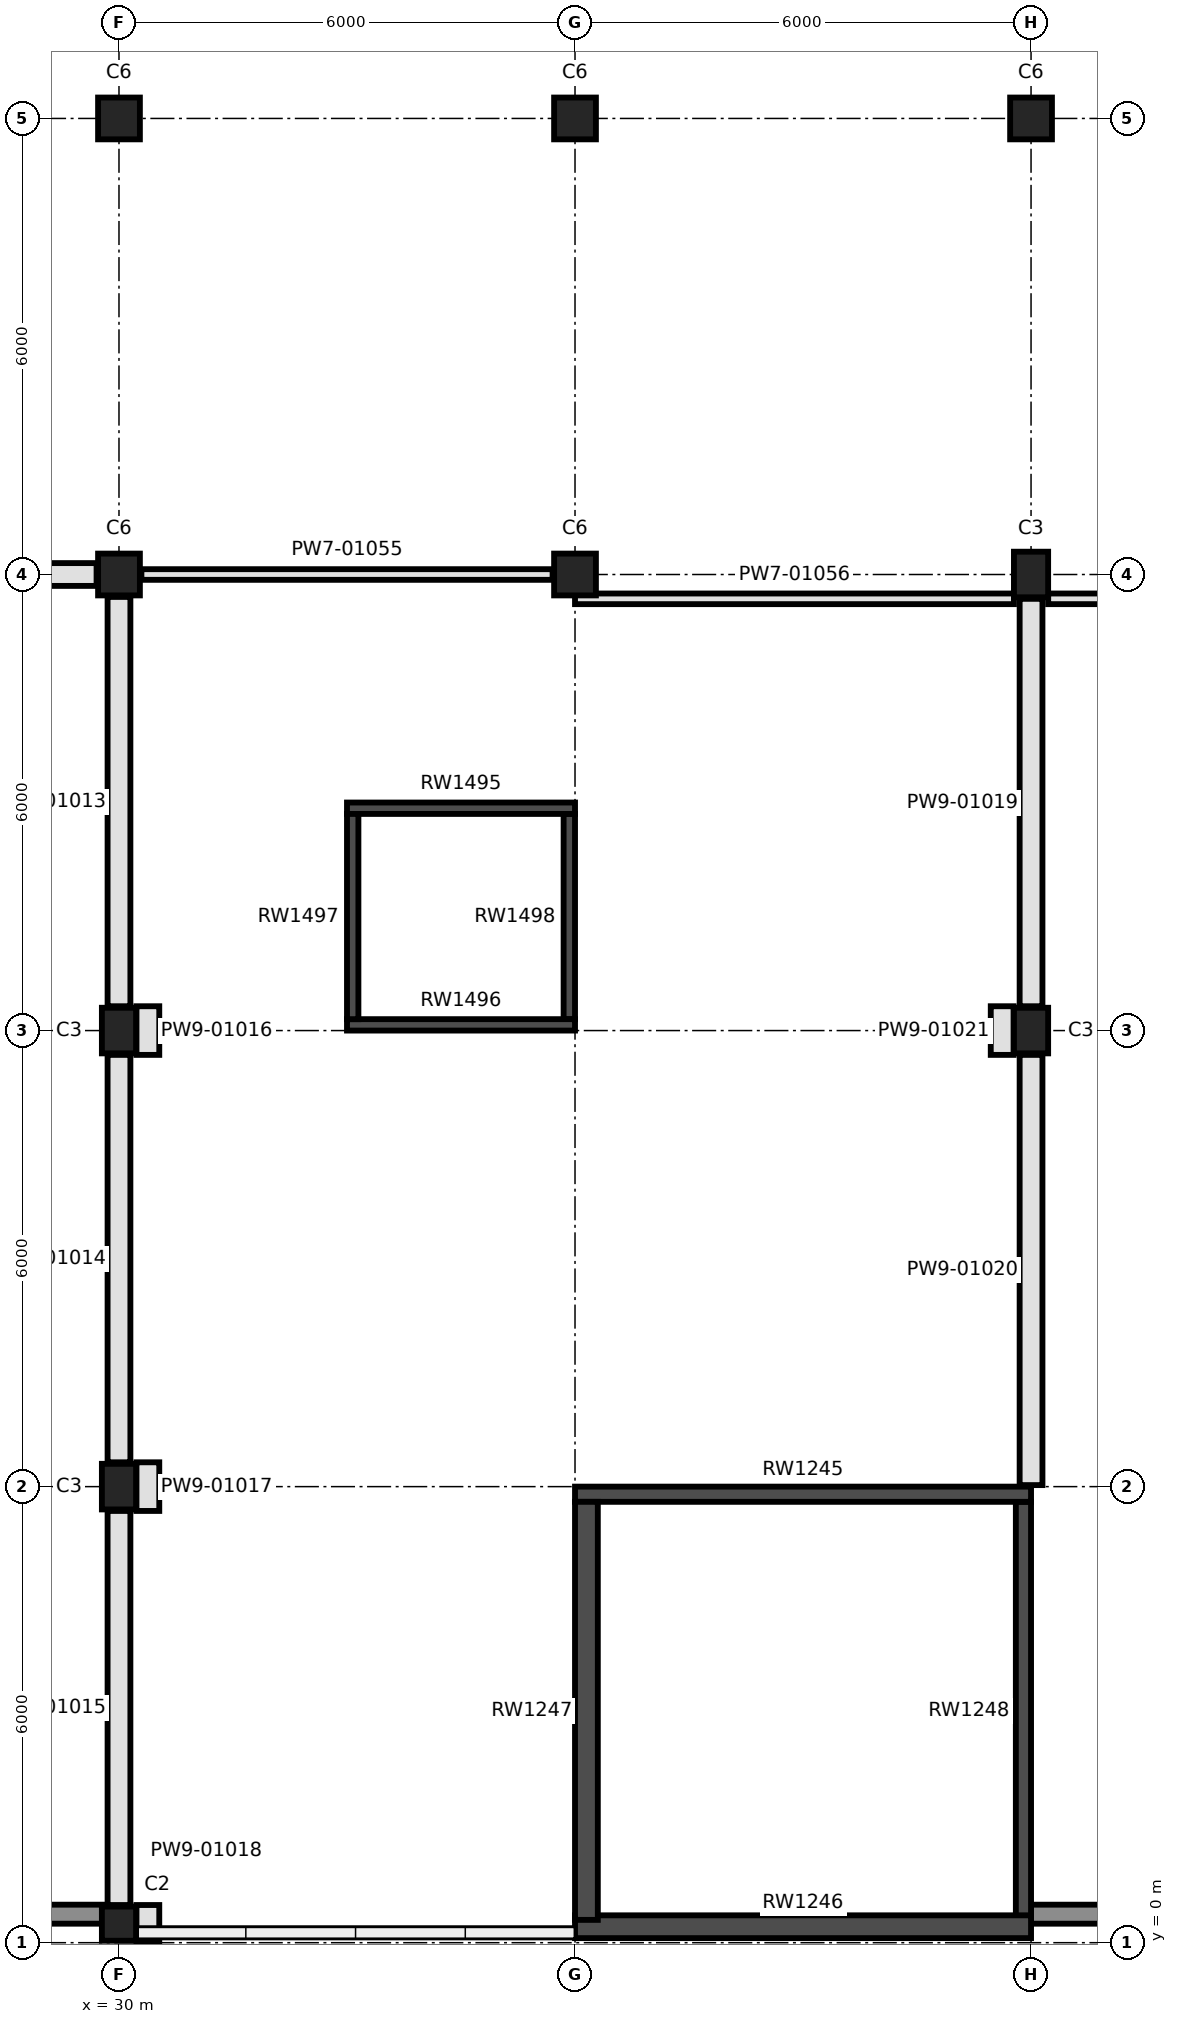
"""IFC4 building model, lengths in metres.
Left out: names, types, materials, properties, quantities, classifications, styles, units other than length and angle.
Written with IfcOpenShell. Run it as: python <this file> out.ifc"""

import sys

from ifc_helpers import new_model, si_unit, direction, frame, frame_2d, origin, origin_2d, place, context, subcontext, project, spatial, rectangle, extrude, element, fill, save


model = new_model("IFC4")
c1 = context("Model", 3, precision=1e-05, world=origin(), true_north=direction((0.0, 1.0)))
c2 = subcontext(c1, "Body", "Model", "MODEL_VIEW")
j1 = project(units=[si_unit("LENGTHUNIT", "METRE"), si_unit("PLANEANGLEUNIT", "RADIAN")], contexts=[c1])
p1 = place(None, origin())
s1 = spatial("IfcSite", under=j1, at=p1, CompositionType="ELEMENT")
p2 = place(p1, origin())
s2 = spatial("IfcBuilding", under=s1, at=p2, CompositionType="ELEMENT")
p3 = place(p2, frame((0.0, 0.0, 7.0)))
s3 = spatial("IfcBuildingStorey", under=s2, at=p3, CompositionType="ELEMENT", Elevation=7.0)
p4 = place(p3, frame((30.0, 0.25, 0.0), z_axis=(0.0, 0.0, 1.0), x_axis=(1.0, 0.0, 0.0)))
e1 = element("IfcColumn", 1, at=p4, inside=s3, PredefinedType="COLUMN", context=c2, shape_type="SweptSolid", body=[
    extrude(rectangle(XDim=0.45, YDim=0.45, at=origin_2d()), origin(), (0.0, 0.0, 1.0), 5.0),
])
for number, where, z_axis, x_axis in (
    (2, (30.0, 6.0, 0.0), (0.0, 0.0, 1.0), (1.0, 0.0, 0.0)),
    (3, (30.0, 12.0, 0.0), (0.0, 0.0, 1.0), (1.0, 0.0, 0.0)),
    (4, (42.0, 12.0, 0.0), (0.0, 0.0, 1.0), (1.0, 0.0, 0.0)),
):
    element("IfcColumn", number, at=place(p3, frame(where, z_axis=z_axis, x_axis=x_axis)), inside=s3, PredefinedType="COLUMN", context=c2, shape_type="SweptSolid", body=[
        extrude(rectangle(XDim=0.45, YDim=0.6, at=origin_2d()), origin(), (0.0, 0.0, 1.0), 5.0),
    ])
for number, where, z_axis, x_axis in (
    (5, (30.0, 18.0, 0.0), (0.0, 0.0, 1.0), (1.0, 0.0, 0.0)),
    (6, (36.0, 18.0, 0.0), (0.0, 0.0, 1.0), (1.0, 0.0, 0.0)),
):
    element("IfcColumn", number, at=place(p3, frame(where, z_axis=z_axis, x_axis=x_axis)), inside=s3, PredefinedType="COLUMN", context=c2, shape_type="SweptSolid", body=[
        extrude(rectangle(XDim=0.55, YDim=0.55, at=origin_2d()), origin(), (0.0, 0.0, 1.0), 5.0),
    ])
p5 = place(p3, frame((42.0, 18.0, 0.0), z_axis=(0.0, 0.0, 1.0), x_axis=(1.0, 0.0, 0.0)))
e7 = element("IfcColumn", 7, at=p5, inside=s3, PredefinedType="COLUMN", context=c2, shape_type="SweptSolid", body=[
    extrude(rectangle(XDim=0.45, YDim=0.6, at=origin_2d()), origin(), (0.0, 0.0, 1.0), 5.0),
])
for number, where, z_axis, x_axis in (
    (8, (30.0, 24.0, 0.0), (0.0, 0.0, 1.0), (1.0, 0.0, 0.0)),
    (9, (36.0, 24.0, 0.0), (0.0, 0.0, 1.0), (1.0, 0.0, 0.0)),
    (10, (42.0, 24.0, 0.0), (0.0, 0.0, 1.0), (1.0, 0.0, 0.0)),
):
    element("IfcColumn", number, at=place(p3, frame(where, z_axis=z_axis, x_axis=x_axis)), inside=s3, PredefinedType="COLUMN", context=c2, shape_type="SweptSolid", body=[
        extrude(rectangle(XDim=0.55, YDim=0.55, at=origin_2d()), origin(), (0.0, 0.0, 1.0), 5.0),
    ])
p6 = place(p3, frame((36.0, 5.9, 0.0), z_axis=(0.0, 0.0, 1.0), x_axis=(1.0, 0.0, 0.0)))
e11 = element("IfcWall", 11, at=p6, inside=s3, PredefinedType="SHEAR", context=c2, shape_type="SweptSolid", body=[
    extrude(rectangle(XDim=6.0, YDim=0.2, at=frame_2d((3.0, 0.0))), origin(), (0.0, 0.0, 1.0), 5.0),
])
p7 = place(p6, frame((0.3, 0.0, 0.0)))
e12 = element("IfcOpeningElement", 12, at=p7, cuts=e11, PredefinedType="OPENING", context=c2, shape_type="SweptSolid", body=[
    extrude(rectangle(XDim=1.1, YDim=2.2, at=frame_2d((0.55, 1.1))), frame((0.0, 0.11, 0.0), z_axis=(0.0, -1.0, 0.0), x_axis=(1.0, 0.0, 0.0)), (0.0, 0.0, 1.0), 0.22),
])
p8 = place(p3, frame((36.0, 0.21, 0.0), z_axis=(0.0, 0.0, 1.0), x_axis=(1.0, 0.0, 0.0)))
e13 = element("IfcWall", 13, at=p8, inside=s3, PredefinedType="SHEAR", context=c2, shape_type="SweptSolid", body=[
    extrude(rectangle(XDim=6.0, YDim=0.3, at=frame_2d((3.0, 0.0))), origin(), (0.0, 0.0, 1.0), 5.0),
])
p9 = place(p3, frame((36.15, 0.3, 0.0), z_axis=(0.0, 0.0, 1.0), x_axis=(0.0, 1.0, 0.0)))
e14 = element("IfcWall", 14, at=p9, inside=s3, PredefinedType="SHEAR", context=c2, shape_type="SweptSolid", body=[
    extrude(rectangle(XDim=5.5, YDim=0.3, at=frame_2d((2.75, 0.0))), origin(), (0.0, 0.0, 1.0), 5.0),
])
p10 = place(p9, frame((1.8, 0.0, 0.0)))
e15 = element("IfcOpeningElement", 15, at=p10, cuts=e14, PredefinedType="OPENING", context=c2, shape_type="SweptSolid", body=[
    extrude(rectangle(XDim=1.8, YDim=2.2, at=frame_2d((0.9, 1.1))), frame((0.0, 0.16, 0.0), z_axis=(0.0, -1.0, 0.0), x_axis=(1.0, 0.0, 0.0)), (0.0, 0.0, 1.0), 0.32),
])
p11 = place(p3, frame((41.9, 0.3, 0.0), z_axis=(0.0, 0.0, 1.0), x_axis=(0.0, 1.0, 0.0)))
e16 = element("IfcWall", 16, at=p11, inside=s3, PredefinedType="SHEAR", context=c2, shape_type="SweptSolid", body=[
    extrude(rectangle(XDim=5.5, YDim=0.2, at=frame_2d((2.75, 0.0))), origin(), (0.0, 0.0, 1.0), 5.0),
])
for number, where, z_axis, x_axis in (
    (17, (33.0, 14.925, 0.0), (0.0, 0.0, 1.0), (1.0, 0.0, 0.0)),
    (18, (33.0, 12.075, 0.0), (0.0, 0.0, 1.0), (1.0, 0.0, 0.0)),
):
    element("IfcWall", number, at=place(p3, frame(where, z_axis=z_axis, x_axis=x_axis)), inside=s3, PredefinedType="SHEAR", context=c2, shape_type="SweptSolid", body=[
        extrude(rectangle(XDim=3.0, YDim=0.15, at=frame_2d((1.5, 0.0))), origin(), (0.0, 0.0, 1.0), 5.0),
    ])
for number, where, z_axis, x_axis in (
    (19, (33.075, 12.15, 0.0), (0.0, 0.0, 1.0), (0.0, 1.0, 0.0)),
    (20, (35.925, 12.15, 0.0), (0.0, 0.0, 1.0), (0.0, 1.0, 0.0)),
):
    element("IfcWall", number, at=place(p3, frame(where, z_axis=z_axis, x_axis=x_axis)), inside=s3, PredefinedType="SHEAR", context=c2, shape_type="SweptSolid", body=[
        extrude(rectangle(XDim=2.7, YDim=0.15, at=frame_2d((1.35, 0.0))), origin(), (0.0, 0.0, 1.0), 5.0),
    ])
p12 = place(p3, frame((47.8, 0.375, 0.0), z_axis=(0.0, 0.0, 1.0), x_axis=(-1.0, 0.0, 0.0)))
e21 = element("IfcWall", 21, at=p12, inside=s3, PredefinedType="SOLIDWALL", context=c2, shape_type="SweptSolid", body=[
    extrude(rectangle(XDim=5.8, YDim=0.25, at=frame_2d((2.9, 0.0))), origin(), (0.0, 0.0, 1.0), 9.5),
])
p13 = place(p3, frame((29.8, 0.375, 0.0), z_axis=(0.0, 0.0, 1.0), x_axis=(-1.0, 0.0, 0.0)))
e22 = element("IfcWall", 22, at=p13, inside=s3, PredefinedType="SOLIDWALL", context=c2, shape_type="SweptSolid", body=[
    extrude(rectangle(XDim=5.6, YDim=0.25, at=frame_2d((2.8, 0.0))), origin(), (0.0, 0.0, 1.0), 8.9),
])
p14 = place(p3, frame((24.32, 18.0, 0.0), z_axis=(0.0, 0.0, 1.0), x_axis=(1.0, 0.0, 0.0)))
e23 = element("IfcWall", 23, at=p14, inside=s3, PredefinedType="PARTITIONING", context=c2, shape_type="SweptSolid", body=[
    extrude(rectangle(XDim=5.385, YDim=0.3, at=frame_2d((2.692, 0.0))), origin(), (0.0, 0.0, 1.0), 4.1),
])
p15 = place(p14, frame((1.73, 0.0, 0.0)))
e24 = element("IfcOpeningElement", 24, at=p15, cuts=e23, PredefinedType="OPENING", context=c2, shape_type="SweptSolid", body=[
    extrude(rectangle(XDim=1.8, YDim=2.1, at=frame_2d((0.9, 1.05))), frame((0.0, 0.16, 0.0), z_axis=(0.0, -1.0, 0.0), x_axis=(1.0, 0.0, 0.0)), (0.0, 0.0, 1.0), 0.32),
])
p16 = place(p3, frame((30.0, 12.32, 0.0), z_axis=(0.0, 0.0, 1.0), x_axis=(0.0, 1.0, 0.0)))
e25 = element("IfcWall", 25, at=p16, inside=s3, PredefinedType="PARTITIONING", context=c2, shape_type="SweptSolid", body=[
    extrude(rectangle(XDim=5.385, YDim=0.3, at=frame_2d((2.692, 0.0))), origin(), (0.0, 0.0, 1.0), 4.1),
])
p17 = place(p3, frame((30.0, 6.32, 0.0), z_axis=(0.0, 0.0, 1.0), x_axis=(0.0, 1.0, 0.0)))
e26 = element("IfcWall", 26, at=p17, inside=s3, PredefinedType="PARTITIONING", context=c2, shape_type="SweptSolid", body=[
    extrude(rectangle(XDim=5.36, YDim=0.3, at=frame_2d((2.68, 0.0))), origin(), (0.0, 0.0, 1.0), 4.1),
])
p18 = place(p17, frame((1.73, 0.0, 0.0)))
e27 = element("IfcOpeningElement", 27, at=p18, cuts=e26, PredefinedType="OPENING", context=c2, shape_type="SweptSolid", body=[
    extrude(rectangle(XDim=1.8, YDim=2.1, at=frame_2d((0.9, 1.05))), frame((0.0, 0.16, 0.0), z_axis=(0.0, -1.0, 0.0), x_axis=(1.0, 0.0, 0.0)), (0.0, 0.0, 1.0), 0.32),
])
p19 = place(p3, frame((30.0, 0.496, 0.0), z_axis=(0.0, 0.0, 1.0), x_axis=(0.0, 1.0, 0.0)))
e28 = element("IfcWall", 28, at=p19, inside=s3, PredefinedType="PARTITIONING", context=c2, shape_type="SweptSolid", body=[
    extrude(rectangle(XDim=5.184, YDim=0.3, at=frame_2d((2.592, 0.0))), origin(), (0.0, 0.0, 1.0), 4.1),
])
p20 = place(p19, frame((1.554, 0.0, 0.0)))
e29 = element("IfcOpeningElement", 29, at=p20, cuts=e28, PredefinedType="OPENING", context=c2, shape_type="SweptSolid", body=[
    extrude(rectangle(XDim=1.8, YDim=2.1, at=frame_2d((0.9, 1.05))), frame((0.0, 0.16, 0.0), z_axis=(0.0, -1.0, 0.0), x_axis=(1.0, 0.0, 0.0)), (0.0, 0.0, 1.0), 0.32),
])
for number, where, z_axis, x_axis in (
    (30, (30.38, 11.68, 0.0), (0.0, 0.0, 1.0), (0.0, 1.0, 0.0)),
    (31, (30.38, 5.68, 0.0), (0.0, 0.0, 1.0), (0.0, 1.0, 0.0)),
):
    element("IfcWall", number, at=place(p3, frame(where, z_axis=z_axis, x_axis=x_axis)), inside=s3, PredefinedType="PARTITIONING", context=c2, shape_type="SweptSolid", body=[
        extrude(rectangle(XDim=0.64, YDim=0.3, at=frame_2d((0.32, 0.0))), origin(), (0.0, 0.0, 1.0), 4.05),
    ])
p21 = place(p3, frame((30.38, 0.006, 0.0), z_axis=(0.0, 0.0, 1.0), x_axis=(0.0, 1.0, 0.0)))
e32 = element("IfcWall", 32, at=p21, inside=s3, PredefinedType="PARTITIONING", context=c2, shape_type="SweptSolid", body=[
    extrude(rectangle(XDim=0.49, YDim=0.3, at=frame_2d((0.245, 0.0))), origin(), (0.0, 0.0, 1.0), 4.1),
])
p22 = place(p3, frame((42.0, 12.32, 0.0), z_axis=(0.0, 0.0, 1.0), x_axis=(0.0, 1.0, 0.0)))
e33 = element("IfcWall", 33, at=p22, inside=s3, PredefinedType="PARTITIONING", context=c2, shape_type="SweptSolid", body=[
    extrude(rectangle(XDim=5.36, YDim=0.3, at=frame_2d((2.68, 0.0))), origin(), (0.0, 0.0, 1.0), 4.1),
])
p23 = place(p22, frame((1.73, 0.0, 0.0)))
e34 = element("IfcOpeningElement", 34, at=p23, cuts=e33, PredefinedType="OPENING", context=c2, shape_type="SweptSolid", body=[
    extrude(rectangle(XDim=1.8, YDim=2.1, at=frame_2d((0.9, 1.05))), frame((0.0, 0.16, 0.0), z_axis=(0.0, -1.0, 0.0), x_axis=(1.0, 0.0, 0.0)), (0.0, 0.0, 1.0), 0.32),
])
p24 = place(p3, frame((42.0, 6.02, 0.0), z_axis=(0.0, 0.0, 1.0), x_axis=(0.0, 1.0, 0.0)))
e35 = element("IfcWall", 35, at=p24, inside=s3, PredefinedType="PARTITIONING", context=c2, shape_type="SweptSolid", body=[
    extrude(rectangle(XDim=5.66, YDim=0.3, at=frame_2d((2.83, 0.0))), origin(), (0.0, 0.0, 1.0), 4.1),
])
p25 = place(p24, frame((2.03, 0.0, 0.0)))
e36 = element("IfcOpeningElement", 36, at=p25, cuts=e35, PredefinedType="OPENING", context=c2, shape_type="SweptSolid", body=[
    extrude(rectangle(XDim=1.8, YDim=2.1, at=frame_2d((0.9, 1.05))), frame((0.0, 0.16, 0.0), z_axis=(0.0, -1.0, 0.0), x_axis=(1.0, 0.0, 0.0)), (0.0, 0.0, 1.0), 0.32),
])
p26 = place(p3, frame((41.62, 11.68, 0.0), z_axis=(0.0, 0.0, 1.0), x_axis=(0.0, 1.0, 0.0)))
e37 = element("IfcWall", 37, at=p26, inside=s3, PredefinedType="PARTITIONING", context=c2, shape_type="SweptSolid", body=[
    extrude(rectangle(XDim=0.64, YDim=0.3, at=frame_2d((0.32, 0.0))), origin(), (0.0, 0.0, 1.0), 4.1),
])
p27 = place(p3, frame((30.295, 18.0, 0.0), z_axis=(0.0, 0.0, 1.0), x_axis=(1.0, 0.0, 0.0)))
e38 = element("IfcWall", 38, at=p27, inside=s3, PredefinedType="PARTITIONING", context=c2, shape_type="SweptSolid", body=[
    extrude(rectangle(XDim=5.41, YDim=0.14, at=frame_2d((2.705, 0.0))), origin(), (0.0, 0.0, 1.0), 4.05),
])
p28 = place(p27, frame((0.255, 0.0, 0.0)))
e39 = element("IfcOpeningElement", 39, at=p28, cuts=e38, PredefinedType="OPENING", context=c2, shape_type="SweptSolid", body=[
    extrude(rectangle(XDim=1.8, YDim=2.1, at=frame_2d((0.9, 1.05))), frame((0.0, 0.08, 0.0), z_axis=(0.0, -1.0, 0.0), x_axis=(1.0, 0.0, 0.0)), (0.0, 0.0, 1.0), 0.16),
])
p29 = place(p27, frame((3.255, 0.0, 0.0)))
e40 = element("IfcOpeningElement", 40, at=p29, cuts=e38, PredefinedType="OPENING", context=c2, shape_type="SweptSolid", body=[
    extrude(rectangle(XDim=1.8, YDim=2.1, at=frame_2d((0.9, 1.05))), frame((0.0, 0.08, 0.0), z_axis=(0.0, -1.0, 0.0), x_axis=(1.0, 0.0, 0.0)), (0.0, 0.0, 1.0), 0.16),
])
p30 = place(p3, frame((36.0, 17.68, 0.0), z_axis=(0.0, 0.0, 1.0), x_axis=(1.0, 0.0, 0.0)))
e41 = element("IfcWall", 41, at=p30, inside=s3, PredefinedType="PARTITIONING", context=c2, shape_type="SweptSolid", body=[
    extrude(rectangle(XDim=5.775, YDim=0.14, at=frame_2d((2.887, 0.0))), origin(), (0.0, 0.0, 1.0), 4.1),
])
p31 = place(p3, frame((42.225, 17.68, 0.0), z_axis=(0.0, 0.0, 1.0), x_axis=(1.0, 0.0, 0.0)))
e42 = element("IfcWall", 42, at=p31, inside=s3, PredefinedType="PARTITIONING", context=c2, shape_type="SweptSolid", body=[
    extrude(rectangle(XDim=11.775, YDim=0.14, at=frame_2d((5.887, 0.0))), origin(), (0.0, 0.0, 1.0), 5.0),
])
p32 = place(p20, frame((1.8, 0.0, 0.0), z_axis=(0.0, 0.0, 1.0), x_axis=(-1.0, 0.0, 0.0)))
e43 = element("IfcDoor", 43, at=p32, inside=s3, OperationType="DOUBLE_DOOR_SINGLE_SWING", PredefinedType="DOOR", context=c2, shape_type="SweptSolid", body=[
    extrude(rectangle(XDim=1.8, YDim=2.1, at=frame_2d((0.9, 1.05))), frame((0.0, 0.025, 0.0), z_axis=(0.0, -1.0, 0.0), x_axis=(1.0, 0.0, 0.0)), (0.0, 0.0, 1.0), 0.05),
])
fill(e29, e43)
p33 = place(p18, frame((1.8, 0.0, 0.0), z_axis=(0.0, 0.0, 1.0), x_axis=(-1.0, 0.0, 0.0)))
e44 = element("IfcDoor", 44, at=p33, inside=s3, OperationType="DOUBLE_DOOR_SINGLE_SWING", PredefinedType="DOOR", context=c2, shape_type="SweptSolid", body=[
    extrude(rectangle(XDim=1.8, YDim=2.1, at=frame_2d((0.9, 1.05))), frame((0.0, 0.025, 0.0), z_axis=(0.0, -1.0, 0.0), x_axis=(1.0, 0.0, 0.0)), (0.0, 0.0, 1.0), 0.05),
])
fill(e27, e44)
p34 = place(p25, origin())
e45 = element("IfcDoor", 45, at=p34, inside=s3, OperationType="DOUBLE_DOOR_SINGLE_SWING", PredefinedType="DOOR", context=c2, shape_type="SweptSolid", body=[
    extrude(rectangle(XDim=1.8, YDim=2.1, at=frame_2d((0.9, 1.05))), frame((0.0, 0.025, 0.0), z_axis=(0.0, -1.0, 0.0), x_axis=(1.0, 0.0, 0.0)), (0.0, 0.0, 1.0), 0.05),
])
fill(e36, e45)
p35 = place(p23, origin())
e46 = element("IfcDoor", 46, at=p35, inside=s3, OperationType="DOUBLE_DOOR_SINGLE_SWING", PredefinedType="DOOR", context=c2, shape_type="SweptSolid", body=[
    extrude(rectangle(XDim=1.8, YDim=2.1, at=frame_2d((0.9, 1.05))), frame((0.0, 0.025, 0.0), z_axis=(0.0, -1.0, 0.0), x_axis=(1.0, 0.0, 0.0)), (0.0, 0.0, 1.0), 0.05),
])
fill(e34, e46)
p36 = place(p10, frame((1.8, 0.0, 0.0), z_axis=(0.0, 0.0, 1.0), x_axis=(-1.0, 0.0, 0.0)))
e47 = element("IfcDoor", 47, at=p36, inside=s3, OperationType="DOUBLE_DOOR_SINGLE_SWING", PredefinedType="DOOR", context=c2, shape_type="SweptSolid", body=[
    extrude(rectangle(XDim=1.8, YDim=2.2, at=frame_2d((0.9, 1.1))), frame((0.0, 0.025, 0.0), z_axis=(0.0, -1.0, 0.0), x_axis=(1.0, 0.0, 0.0)), (0.0, 0.0, 1.0), 0.05),
])
fill(e15, e47)
p37 = place(p7, frame((1.1, 0.0, 0.0), z_axis=(0.0, 0.0, 1.0), x_axis=(-1.0, 0.0, 0.0)))
e48 = element("IfcDoor", 48, at=p37, inside=s3, OperationType="SINGLE_SWING_LEFT", PredefinedType="DOOR", context=c2, shape_type="SweptSolid", body=[
    extrude(rectangle(XDim=1.1, YDim=2.2, at=frame_2d((0.55, 1.1))), frame((0.0, 0.025, 0.0), z_axis=(0.0, -1.0, 0.0), x_axis=(1.0, 0.0, 0.0)), (0.0, 0.0, 1.0), 0.05),
])
fill(e12, e48)
p38 = place(p28, origin())
e49 = element("IfcDoor", 49, at=p38, inside=s3, OperationType="DOUBLE_DOOR_SINGLE_SWING", PredefinedType="DOOR", context=c2, shape_type="SweptSolid", body=[
    extrude(rectangle(XDim=1.8, YDim=2.1, at=frame_2d((0.9, 1.05))), frame((0.0, 0.025, 0.0), z_axis=(0.0, -1.0, 0.0), x_axis=(1.0, 0.0, 0.0)), (0.0, 0.0, 1.0), 0.05),
])
fill(e39, e49)
p39 = place(p29, origin())
e50 = element("IfcDoor", 50, at=p39, inside=s3, OperationType="DOUBLE_DOOR_SINGLE_SWING", PredefinedType="DOOR", context=c2, shape_type="SweptSolid", body=[
    extrude(rectangle(XDim=1.8, YDim=2.1, at=frame_2d((0.9, 1.05))), frame((0.0, 0.025, 0.0), z_axis=(0.0, -1.0, 0.0), x_axis=(1.0, 0.0, 0.0)), (0.0, 0.0, 1.0), 0.05),
])
fill(e40, e50)
save(model, sys.argv[1])
